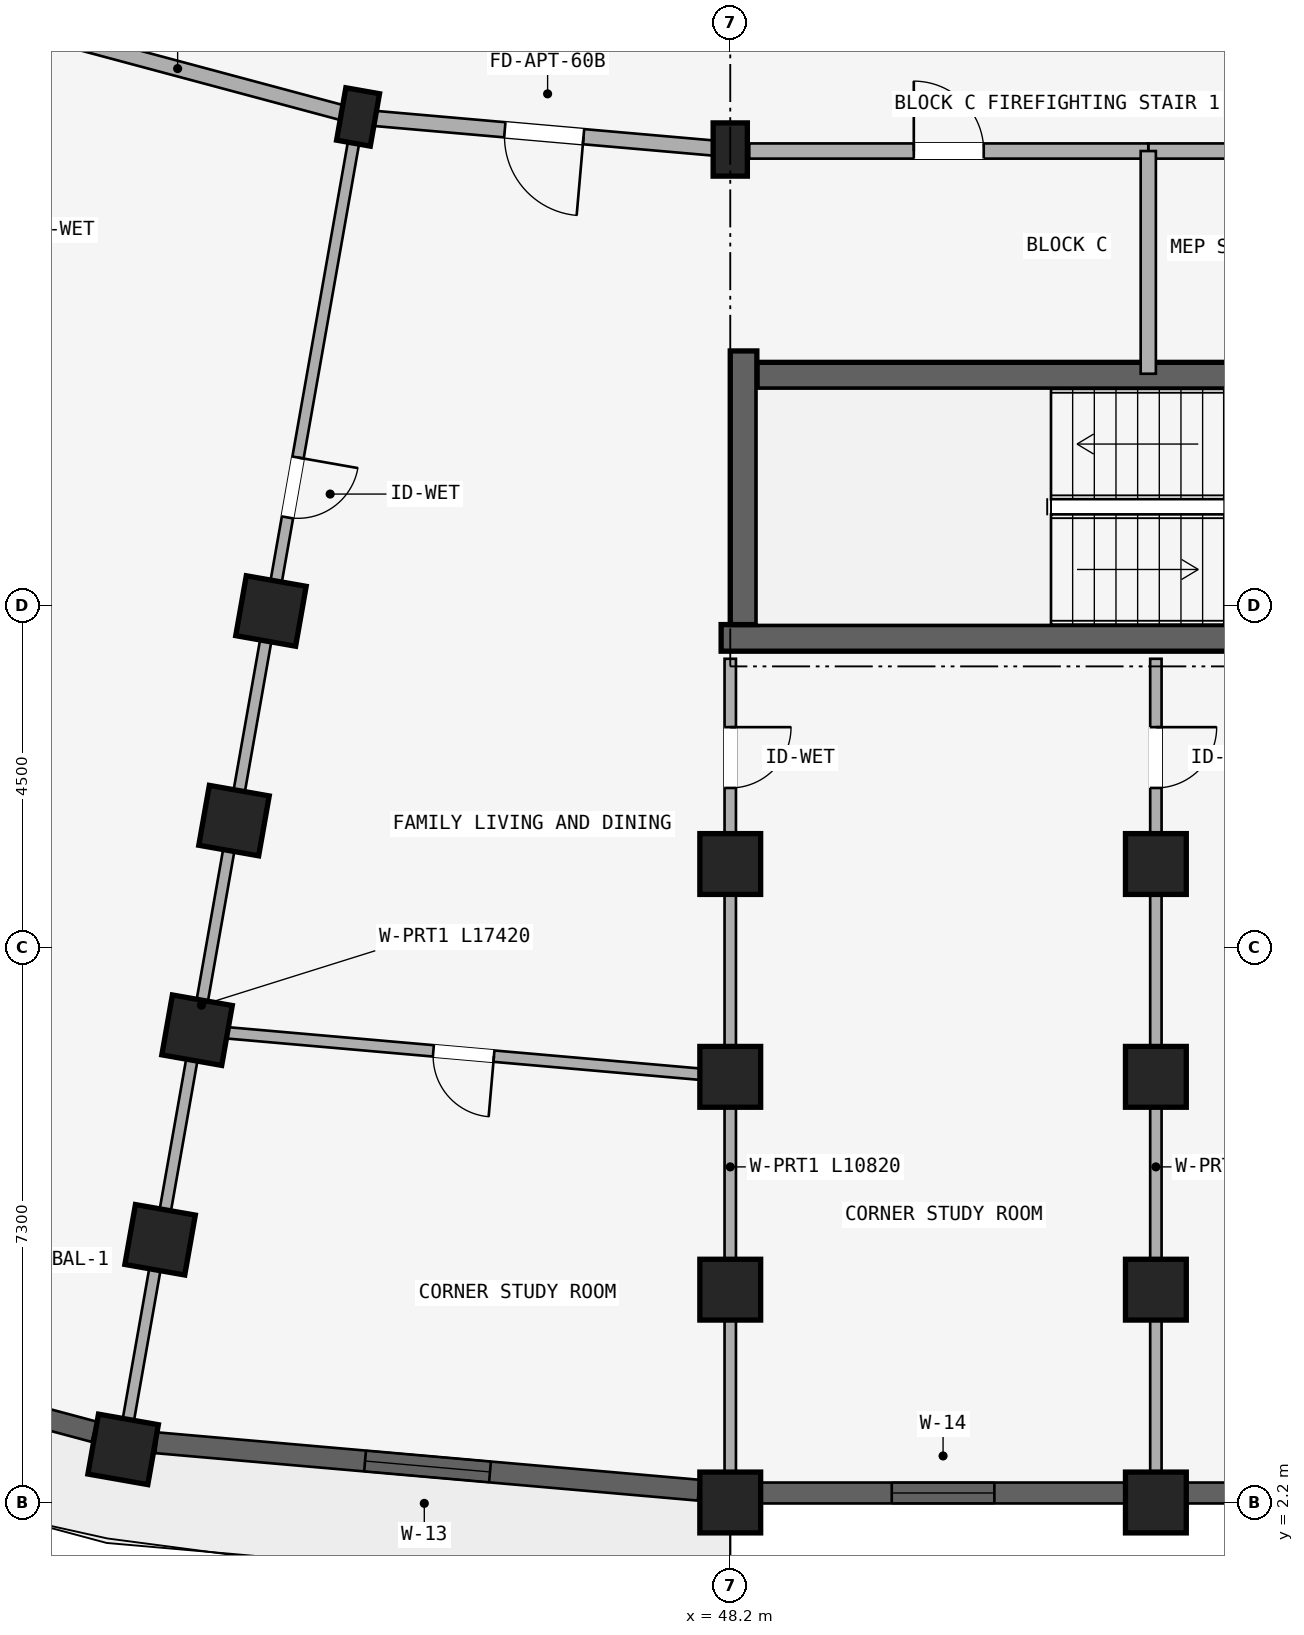
"""IFC4 building model, lengths in metres.
Left out: names, types, materials, properties, quantities, classifications, styles, units other than length and angle.
Written with IfcOpenShell. Run it as: python <this file> out.ifc"""

import sys

from ifc_helpers import new_model, si_unit, direction, frame, frame_2d, origin, origin_2d, place, context, subcontext, project, spatial, rectangle, extrude, element, fill, save


model = new_model("IFC4")
c1 = context("Model", 3, precision=1e-05, world=origin(), true_north=direction((0.0, 1.0)))
c2 = subcontext(c1, "Body", "Model", "MODEL_VIEW")
j1 = project(units=[si_unit("LENGTHUNIT", "METRE"), si_unit("PLANEANGLEUNIT", "RADIAN")], contexts=[c1])
p1 = place(None, origin())
s1 = spatial("IfcSite", under=j1, at=p1, CompositionType="ELEMENT")
p2 = place(p1, origin())
s2 = spatial("IfcBuilding", under=s1, at=p2, CompositionType="ELEMENT")
p3 = place(p2, frame((0.0, 0.0, 11.85)))
s3 = spatial("IfcBuildingStorey", under=s2, at=p3, CompositionType="ELEMENT", Elevation=11.85)
p4 = place(p3, frame((48.08, 13.575, 0.0), z_axis=(0.0, 0.0, 1.0), x_axis=(1.0, 0.0, 0.0)))
e1 = element("IfcWall", 1, at=p4, inside=s3, PredefinedType="SHEAR", context=c2, shape_type="SweptSolid", body=[
    extrude(rectangle(XDim=8.545, YDim=0.35, at=frame_2d((4.272, 0.0))), origin(), (0.0, 0.0, 1.0), 2.93),
])
p5 = place(p3, frame((48.55, 17.025, 0.0), z_axis=(0.0, 0.0, 1.0), x_axis=(1.0, 0.0, 0.0)))
e2 = element("IfcWall", 2, at=p5, inside=s3, PredefinedType="SHEAR", context=c2, shape_type="SweptSolid", body=[
    extrude(rectangle(XDim=8.075, YDim=0.35, at=frame_2d((4.038, 0.0))), origin(), (0.0, 0.0, 1.0), 2.93),
])
p6 = place(p5, frame((6.38, 0.0, 0.0)))
e3 = element("IfcOpeningElement", 3, at=p6, cuts=e2, PredefinedType="OPENING", context=c2, shape_type="SweptSolid", body=[
    extrude(rectangle(XDim=1.24, YDim=2.15, at=frame_2d((0.62, 1.075))), frame((0.0, 0.185, 0.0), z_axis=(0.0, -1.0, 0.0), x_axis=(1.0, 0.0, 0.0)), (0.0, 0.0, 1.0), 0.37),
])
p7 = place(p3, frame((48.375, 17.35, 0.0), z_axis=(0.0, 0.0, 1.0), x_axis=(0.0, -1.0, 0.0)))
e4 = element("IfcWall", 4, at=p7, inside=s3, PredefinedType="SHEAR", context=c2, shape_type="SweptSolid", body=[
    extrude(rectangle(XDim=3.6, YDim=0.35, at=frame_2d((1.8, 0.0))), origin(), (0.0, 0.0, 1.0), 2.93),
])
p8 = place(p3, frame((48.2, 20.0, 0.0), z_axis=(0.0, 0.0, 1.0), x_axis=(1.0, 0.0, 0.0)))
e5 = element("IfcColumn", 5, at=p8, inside=s3, PredefinedType="COLUMN", context=c2, shape_type="SweptSolid", body=[
    extrude(rectangle(XDim=0.45, YDim=0.7, at=origin_2d()), origin(), (0.0, 0.0, 1.0), 2.93),
])
for number, where, z_axis, x_axis in (
    (6, (48.2, 10.6, 0.0), (0.0, 0.0, 1.0), (1.0, 0.0, 0.0)),
    (7, (48.2, 7.8, 0.0), (0.0, 0.0, 1.0), (1.0, 0.0, 0.0)),
    (8, (48.2, 5.0, 0.0), (0.0, 0.0, 1.0), (1.0, 0.0, 0.0)),
    (9, (48.2, 2.2, 0.0), (0.0, 0.0, 1.0), (1.0, 0.0, 0.0)),
):
    element("IfcColumn", number, at=place(p3, frame(where, z_axis=z_axis, x_axis=x_axis)), inside=s3, PredefinedType="COLUMN", context=c2, shape_type="SweptSolid", body=[
        extrude(rectangle(XDim=0.8, YDim=0.8, at=origin_2d()), origin(), (0.0, 0.0, 1.0), 2.93),
    ])
p9 = place(p3, frame((43.303, 20.428, 0.0), z_axis=(0.0, 0.0, 1.0), x_axis=(-0.984807753012, 0.173648177667, 0.0)))
e10 = element("IfcColumn", 10, at=p9, inside=s3, PredefinedType="COLUMN", context=c2, shape_type="SweptSolid", body=[
    extrude(rectangle(XDim=0.45, YDim=0.7, at=origin_2d()), origin(), (0.0, 0.0, 1.0), 2.93),
])
for number, where, z_axis, x_axis in (
    (11, (42.157, 13.929, 0.0), (0.0, 0.0, 1.0), (-0.985, 0.174, 0.0)),
    (12, (41.671, 11.171, 0.0), (0.0, 0.0, 1.0), (-0.985, 0.174, 0.0)),
    (13, (41.185, 8.414, 0.0), (0.0, 0.0, 1.0), (-0.985, 0.174, 0.0)),
    (14, (40.698, 5.656, 0.0), (0.0, 0.0, 1.0), (-0.985, 0.174, 0.0)),
    (15, (40.212, 2.899, 0.0), (0.0, 0.0, 1.0), (-0.985, 0.174, 0.0)),
    (16, (53.8, 10.6, 0.0), (0.0, 0.0, 1.0), (1.0, 0.0, 0.0)),
    (17, (53.8, 7.8, 0.0), (0.0, 0.0, 1.0), (1.0, 0.0, 0.0)),
    (18, (53.8, 5.0, 0.0), (0.0, 0.0, 1.0), (1.0, 0.0, 0.0)),
    (19, (53.8, 2.2, 0.0), (0.0, 0.0, 1.0), (1.0, 0.0, 0.0)),
):
    element("IfcColumn", number, at=place(p3, frame(where, z_axis=z_axis, x_axis=x_axis)), inside=s3, PredefinedType="COLUMN", context=c2, shape_type="SweptSolid", body=[
        extrude(rectangle(XDim=0.8, YDim=0.8, at=origin_2d()), origin(), (0.0, 0.0, 1.0), 2.93),
    ])
p10 = place(p3, frame((53.7, 19.98, 0.0), z_axis=(0.0, 0.0, 1.0), x_axis=(1.0, 0.0, 0.0)))
e20 = element("IfcWall", 20, at=p10, inside=s3, PredefinedType="STANDARD", context=c2, shape_type="SweptSolid", body=[
    extrude(rectangle(XDim=5.65, YDim=0.2, at=frame_2d((2.825, 0.0))), origin(), (0.0, 0.0, 1.0), 2.372),
])
p11 = place(p10, frame((1.923, 0.0, 0.0)))
e21 = element("IfcOpeningElement", 21, at=p11, cuts=e20, PredefinedType="OPENING", context=c2, shape_type="SweptSolid", body=[
    extrude(rectangle(XDim=1.24, YDim=2.15, at=frame_2d((0.62, 1.075))), frame((0.0, 0.11, 0.0), z_axis=(0.0, -1.0, 0.0), x_axis=(1.0, 0.0, 0.0)), (0.0, 0.0, 1.0), 0.22),
])
p12 = place(p3, frame((48.45, 19.98, 0.0), z_axis=(0.0, 0.0, 1.0), x_axis=(1.0, 0.0, 0.0)))
e22 = element("IfcWall", 22, at=p12, inside=s3, PredefinedType="STANDARD", context=c2, shape_type="SweptSolid", body=[
    extrude(rectangle(XDim=5.25, YDim=0.2, at=frame_2d((2.625, 0.0))), origin(), (0.0, 0.0, 1.0), 2.372),
])
p13 = place(p12, frame((2.165, 0.0, 0.0)))
e23 = element("IfcOpeningElement", 23, at=p13, cuts=e22, PredefinedType="OPENING", context=c2, shape_type="SweptSolid", body=[
    extrude(rectangle(XDim=0.92, YDim=2.1, at=frame_2d((0.46, 1.05))), frame((0.0, 0.11, 0.0), z_axis=(0.0, -1.0, 0.0), x_axis=(1.0, 0.0, 0.0)), (0.0, 0.0, 1.0), 0.22),
])
p14 = place(p3, frame((53.7, 19.98, 0.0), z_axis=(0.0, 0.0, 1.0), x_axis=(0.0, -1.0, 0.0)))
e24 = element("IfcWall", 24, at=p14, inside=s3, PredefinedType="STANDARD", context=c2, shape_type="SweptSolid", body=[
    extrude(rectangle(XDim=2.93, YDim=0.2, at=frame_2d((1.465, 0.0))), origin(), (0.0, 0.0, 1.0), 2.372),
])
p15 = place(p3, frame((53.8, 13.3, 0.0), z_axis=(0.0, 0.0, 1.0), x_axis=(0.0, -1.0, 0.0)))
e25 = element("IfcWall", 25, at=p15, inside=s3, PredefinedType="PARTITIONING", context=c2, shape_type="SweptSolid", body=[
    extrude(rectangle(XDim=10.82, YDim=0.15, at=frame_2d((5.41, 0.0))), origin(), (0.0, 0.0, 1.0), 2.372),
])
p16 = place(p15, frame((0.899, 0.0, 0.0)))
e26 = element("IfcOpeningElement", 26, at=p16, cuts=e25, PredefinedType="OPENING", context=c2, shape_type="SweptSolid", body=[
    extrude(rectangle(XDim=0.8, YDim=2.1, at=frame_2d((0.4, 1.05))), frame((0.0, 0.085, 0.0), z_axis=(0.0, -1.0, 0.0), x_axis=(1.0, 0.0, 0.0)), (0.0, 0.0, 1.0), 0.17),
])
p17 = place(p3, frame((48.2, 20.0, 0.0), z_axis=(0.0, 0.0, 1.0), x_axis=(-0.996193663584, 0.087167566415, 0.0)))
e27 = element("IfcWall", 27, at=p17, inside=s3, PredefinedType="STANDARD", context=c2, shape_type="SweptSolid", body=[
    extrude(rectangle(XDim=4.916, YDim=0.2, at=frame_2d((2.458, 0.0))), origin(), (0.0, 0.0, 1.0), 2.372),
])
p18 = place(p17, frame((1.938, 0.0, 0.0)))
e28 = element("IfcOpeningElement", 28, at=p18, cuts=e27, PredefinedType="OPENING", context=c2, shape_type="SweptSolid", body=[
    extrude(rectangle(XDim=1.04, YDim=2.15, at=frame_2d((0.52, 1.075))), frame((0.0, 0.11, 0.0), z_axis=(0.0, -1.0, 0.0), x_axis=(1.0, 0.0, 0.0)), (0.0, 0.0, 1.0), 0.22),
])
p19 = place(p3, frame((43.303, 20.428, 0.0), z_axis=(0.0, 0.0, 1.0), x_axis=(-0.965930095386, 0.258803112091, 0.0)))
e29 = element("IfcWall", 29, at=p19, inside=s3, PredefinedType="STANDARD", context=c2, shape_type="SweptSolid", body=[
    extrude(rectangle(XDim=4.916, YDim=0.2, at=frame_2d((2.458, 0.0))), origin(), (0.0, 0.0, 1.0), 2.372),
])
p20 = place(p3, frame((48.2, 13.3, 0.0), z_axis=(0.0, 0.0, 1.0), x_axis=(0.0, -1.0, 0.0)))
e30 = element("IfcWall", 30, at=p20, inside=s3, PredefinedType="PARTITIONING", context=c2, shape_type="SweptSolid", body=[
    extrude(rectangle(XDim=10.82, YDim=0.15, at=frame_2d((5.41, 0.0))), origin(), (0.0, 0.0, 1.0), 2.372),
])
p21 = place(p20, frame((0.899, 0.0, 0.0)))
e31 = element("IfcOpeningElement", 31, at=p21, cuts=e30, PredefinedType="OPENING", context=c2, shape_type="SweptSolid", body=[
    extrude(rectangle(XDim=0.8, YDim=2.1, at=frame_2d((0.4, 1.05))), frame((0.0, 0.085, 0.0), z_axis=(0.0, -1.0, 0.0), x_axis=(1.0, 0.0, 0.0)), (0.0, 0.0, 1.0), 0.17),
])
p22 = place(p3, frame((43.286, 20.33, 0.0), z_axis=(0.0, 0.0, 1.0), x_axis=(-0.173646216546, -0.984808098809, 0.0)))
e32 = element("IfcWall", 32, at=p22, inside=s3, PredefinedType="PARTITIONING", context=c2, shape_type="SweptSolid", body=[
    extrude(rectangle(XDim=17.42, YDim=0.15, at=frame_2d((8.71, 0.0))), origin(), (0.0, 0.0, 1.0), 2.372),
])
p23 = place(p22, frame((4.45, 0.0, 0.0)))
e33 = element("IfcOpeningElement", 33, at=p23, cuts=e32, PredefinedType="OPENING", context=c2, shape_type="SweptSolid", body=[
    extrude(rectangle(XDim=0.8, YDim=2.1, at=frame_2d((0.4, 1.05))), frame((0.0, 0.085, 0.0), z_axis=(0.0, -1.0, 0.0), x_axis=(1.0, 0.0, 0.0)), (0.0, 0.0, 1.0), 0.17),
])
p24 = place(p3, frame((48.2, 7.8, 0.0), z_axis=(0.0, 0.0, 1.0), x_axis=(-0.996194658198, 0.087156198737, 0.0)))
e34 = element("IfcWall", 34, at=p24, inside=s3, PredefinedType="PLUMBINGWALL", context=c2, shape_type="SweptSolid", body=[
    extrude(rectangle(XDim=7.042, YDim=0.15, at=frame_2d((3.521, 0.0))), origin(), (0.0, 0.0, 1.0), 2.372),
])
p25 = place(p24, frame((3.121, 0.0, 0.0)))
e35 = element("IfcOpeningElement", 35, at=p25, cuts=e34, PredefinedType="OPENING", context=c2, shape_type="SweptSolid", body=[
    extrude(rectangle(XDim=0.8, YDim=2.1, at=frame_2d((0.4, 1.05))), frame((0.0, 0.085, 0.0), z_axis=(0.0, -1.0, 0.0), x_axis=(1.0, 0.0, 0.0)), (0.0, 0.0, 1.0), 0.17),
])
p26 = place(p3, frame((47.785, 2.362, 0.0), z_axis=(0.0, 0.0, 1.0), x_axis=(-0.99619608453, 0.08713989423, 0.0)))
e36 = element("IfcWall", 36, at=p26, inside=s3, PredefinedType="STANDARD", context=c2, shape_type="SweptSolid", body=[
    extrude(rectangle(XDim=7.164, YDim=0.275, at=frame_2d((3.582, 0.0))), origin(), (0.0, 0.0, 1.0), 2.372),
])
p27 = place(p26, frame((2.757, 0.0, 0.422)))
e37 = element("IfcOpeningElement", 37, at=p27, cuts=e36, PredefinedType="OPENING", context=c2, shape_type="SweptSolid", body=[
    extrude(rectangle(XDim=1.65, YDim=1.75, at=frame_2d((0.825, 0.875))), frame((0.0, 0.147, 0.0), z_axis=(0.0, -1.0, 0.0), x_axis=(1.0, 0.0, 0.0)), (0.0, 0.0, 1.0), 0.295),
])
p28 = place(p3, frame((39.832, 3.13, 0.0), z_axis=(0.0, 0.0, 1.0), x_axis=(-0.965923712619, 0.258826933296, 0.0)))
e38 = element("IfcWall", 38, at=p28, inside=s3, PredefinedType="STANDARD", context=c2, shape_type="SweptSolid", body=[
    extrude(rectangle(XDim=7.164, YDim=0.275, at=frame_2d((3.582, 0.0))), origin(), (0.0, 0.0, 1.0), 2.372),
])
p29 = place(p28, frame((4.69, 0.0, 0.522)))
e39 = element("IfcOpeningElement", 39, at=p29, cuts=e38, PredefinedType="OPENING", context=c2, shape_type="SweptSolid", body=[
    extrude(rectangle(XDim=1.2, YDim=1.5, at=frame_2d((0.6, 0.75))), frame((0.0, 0.147, 0.0), z_axis=(0.0, -1.0, 0.0), x_axis=(1.0, 0.0, 0.0)), (0.0, 0.0, 1.0), 0.295),
])
p30 = place(p28, frame((1.907, 0.0, 0.0)))
e40 = element("IfcOpeningElement", 40, at=p30, cuts=e38, PredefinedType="OPENING", context=c2, shape_type="SweptSolid", body=[
    extrude(rectangle(XDim=1.2, YDim=2.15, at=frame_2d((0.6, 1.075))), frame((0.0, 0.147, 0.0), z_axis=(0.0, -1.0, 0.0), x_axis=(1.0, 0.0, 0.0)), (0.0, 0.0, 1.0), 0.295),
])
p31 = place(p3, frame((48.604, 2.325, 0.0), z_axis=(0.0, 0.0, 1.0), x_axis=(1.0, 0.0, 0.0)))
e41 = element("IfcWall", 41, at=p31, inside=s3, PredefinedType="STANDARD", context=c2, shape_type="SweptSolid", body=[
    extrude(rectangle(XDim=4.793, YDim=0.275, at=frame_2d((2.396, 0.0))), origin(), (0.0, 0.0, 1.0), 2.472),
])
p32 = place(p31, frame((1.721, 0.0, 0.672)))
e42 = element("IfcOpeningElement", 42, at=p32, cuts=e41, PredefinedType="OPENING", context=c2, shape_type="SweptSolid", body=[
    extrude(rectangle(XDim=1.35, YDim=1.6, at=frame_2d((0.675, 0.8))), frame((0.0, 0.147, 0.0), z_axis=(0.0, -1.0, 0.0), x_axis=(1.0, 0.0, 0.0)), (0.0, 0.0, 1.0), 0.295),
])
p33 = place(p3, frame((54.204, 2.325, 0.0), z_axis=(0.0, 0.0, 1.0), x_axis=(1.0, 0.0, 0.0)))
e43 = element("IfcWall", 43, at=p33, inside=s3, PredefinedType="STANDARD", context=c2, shape_type="SweptSolid", body=[
    extrude(rectangle(XDim=4.793, YDim=0.275, at=frame_2d((2.396, 0.0))), origin(), (0.0, 0.0, 1.0), 2.472),
])
p34 = place(p33, frame((1.796, 0.0, 0.772)))
e44 = element("IfcOpeningElement", 44, at=p34, cuts=e43, PredefinedType="OPENING", context=c2, shape_type="SweptSolid", body=[
    extrude(rectangle(XDim=1.2, YDim=1.5, at=frame_2d((0.6, 0.75))), frame((0.0, 0.147, 0.0), z_axis=(0.0, -1.0, 0.0), x_axis=(1.0, 0.0, 0.0)), (0.0, 0.0, 1.0), 0.295),
])
p35 = place(p27, origin())
e45 = element("IfcWindow", 45, at=p35, inside=s3, PartitioningType="DOUBLE_PANEL_VERTICAL", PredefinedType="WINDOW", context=c2, shape_type="SweptSolid", body=[
    extrude(rectangle(XDim=1.65, YDim=1.75, at=frame_2d((0.825, 0.875))), frame((0.0, 0.03, 0.0), z_axis=(0.0, -1.0, 0.0), x_axis=(1.0, 0.0, 0.0)), (0.0, 0.0, 1.0), 0.06),
])
fill(e37, e45)
p36 = place(p32, origin())
e46 = element("IfcWindow", 46, at=p36, inside=s3, PartitioningType="DOUBLE_PANEL_VERTICAL", PredefinedType="WINDOW", context=c2, shape_type="SweptSolid", body=[
    extrude(rectangle(XDim=1.35, YDim=1.6, at=frame_2d((0.675, 0.8))), frame((0.0, 0.03, 0.0), z_axis=(0.0, -1.0, 0.0), x_axis=(1.0, 0.0, 0.0)), (0.0, 0.0, 1.0), 0.06),
])
fill(e42, e46)
p37 = place(p13, frame((0.92, 0.0, 0.0), z_axis=(0.0, 0.0, 1.0), x_axis=(-1.0, 0.0, 0.0)))
e47 = element("IfcDoor", 47, at=p37, inside=s3, OperationType="SINGLE_SWING_RIGHT", PredefinedType="DOOR", context=c2, shape_type="SweptSolid", body=[
    extrude(rectangle(XDim=0.92, YDim=2.1, at=frame_2d((0.46, 1.05))), frame((0.0, 0.025, 0.0), z_axis=(0.0, -1.0, 0.0), x_axis=(1.0, 0.0, 0.0)), (0.0, 0.0, 1.0), 0.05),
])
fill(e23, e47)
p38 = place(p16, frame((0.8, 0.0, 0.0), z_axis=(0.0, 0.0, 1.0), x_axis=(-1.0, 0.0, 0.0)))
e48 = element("IfcDoor", 48, at=p38, inside=s3, OperationType="SINGLE_SWING_RIGHT", PredefinedType="DOOR", context=c2, shape_type="SweptSolid", body=[
    extrude(rectangle(XDim=0.8, YDim=2.1, at=frame_2d((0.4, 1.05))), frame((0.0, 0.025, 0.0), z_axis=(0.0, -1.0, 0.0), x_axis=(1.0, 0.0, 0.0)), (0.0, 0.0, 1.0), 0.05),
])
fill(e26, e48)
p39 = place(p21, frame((0.8, 0.0, 0.0), z_axis=(0.0, 0.0, 1.0), x_axis=(-1.0, 0.0, 0.0)))
e49 = element("IfcDoor", 49, at=p39, inside=s3, OperationType="SINGLE_SWING_RIGHT", PredefinedType="DOOR", context=c2, shape_type="SweptSolid", body=[
    extrude(rectangle(XDim=0.8, YDim=2.1, at=frame_2d((0.4, 1.05))), frame((0.0, 0.025, 0.0), z_axis=(0.0, -1.0, 0.0), x_axis=(1.0, 0.0, 0.0)), (0.0, 0.0, 1.0), 0.05),
])
fill(e31, e49)
p40 = place(p23, frame((0.8, 0.0, 0.0), z_axis=(0.0, 0.0, 1.0), x_axis=(-1.0, 0.0, 0.0)))
e50 = element("IfcDoor", 50, at=p40, inside=s3, OperationType="SINGLE_SWING_RIGHT", PredefinedType="DOOR", context=c2, shape_type="SweptSolid", body=[
    extrude(rectangle(XDim=0.8, YDim=2.1, at=frame_2d((0.4, 1.05))), frame((0.0, 0.025, 0.0), z_axis=(0.0, -1.0, 0.0), x_axis=(1.0, 0.0, 0.0)), (0.0, 0.0, 1.0), 0.05),
])
fill(e33, e50)
p41 = place(p18, origin())
e51 = element("IfcDoor", 51, at=p41, inside=s3, OperationType="SINGLE_SWING_LEFT", PredefinedType="DOOR", context=c2, shape_type="SweptSolid", body=[
    extrude(rectangle(XDim=1.04, YDim=2.15, at=frame_2d((0.52, 1.075))), frame((0.0, 0.025, 0.0), z_axis=(0.0, -1.0, 0.0), x_axis=(1.0, 0.0, 0.0)), (0.0, 0.0, 1.0), 0.05),
])
fill(e28, e51)
p42 = place(p25, frame((0.8, 0.0, 0.0), z_axis=(0.0, 0.0, 1.0), x_axis=(-1.0, 0.0, 0.0)))
e52 = element("IfcDoor", 52, at=p42, inside=s3, OperationType="SINGLE_SWING_RIGHT", PredefinedType="DOOR", context=c2, shape_type="SweptSolid", body=[
    extrude(rectangle(XDim=0.8, YDim=2.1, at=frame_2d((0.4, 1.05))), frame((0.0, 0.025, 0.0), z_axis=(0.0, -1.0, 0.0), x_axis=(1.0, 0.0, 0.0)), (0.0, 0.0, 1.0), 0.05),
])
fill(e35, e52)
save(model, sys.argv[1])
